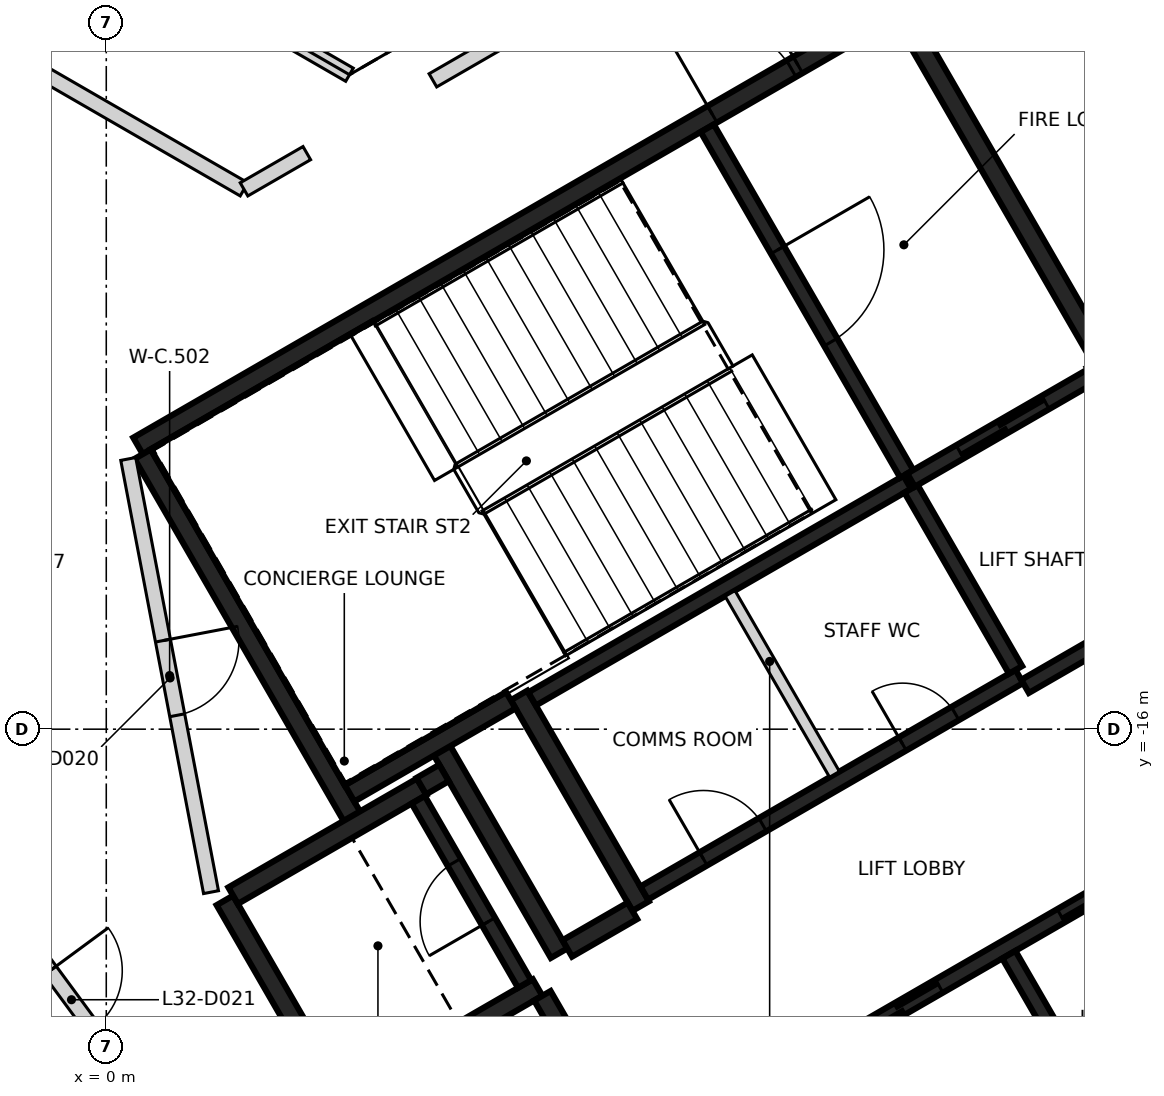
"""IFC4 building model, lengths in metres.
Left out: names, types, materials, properties, quantities, classifications, styles, units other than length and angle.
Written with IfcOpenShell. Run it as: python <this file> out.ifc"""

import sys

from ifc_helpers import new_model, si_unit, direction, frame, frame_2d, origin, place, context, subcontext, project, spatial, rectangle, extrude, element, fill, save


model = new_model("IFC4")
c1 = context("Model", 3, precision=1e-05, world=origin(), true_north=direction((0.0, 1.0)))
c2 = subcontext(c1, "Body", "Model", "MODEL_VIEW")
j1 = project(units=[si_unit("LENGTHUNIT", "METRE"), si_unit("PLANEANGLEUNIT", "RADIAN")], contexts=[c1])
p1 = place(None, origin())
s1 = spatial("IfcSite", under=j1, at=p1, CompositionType="ELEMENT")
p2 = place(p1, origin())
s2 = spatial("IfcBuilding", under=s1, at=p2, CompositionType="ELEMENT")
p3 = place(p2, frame((0.0, 0.0, 132.4)))
s3 = spatial("IfcBuildingStorey", under=s2, at=p3, CompositionType="ELEMENT", Elevation=132.4)
p4 = place(p3, frame((0.417, -12.273, 0.0), z_axis=(0.0, 0.0, 1.0), x_axis=(0.866021906294, 0.500006057782, 0.0)))
e1 = element("IfcWall", 1, at=p4, inside=s3, PredefinedType="SHEAR", context=c2, shape_type="SweptSolid", body=[
    extrude(rectangle(XDim=11.55, YDim=0.25, at=frame_2d((5.775, 0.0))), origin(), (0.0, 0.0, 1.0), 3.2),
])
p5 = place(p4, frame((10.025, 0.0, 0.0)))
e2 = element("IfcOpeningElement", 2, at=p5, cuts=e1, PredefinedType="OPENING", context=c2, shape_type="SweptSolid", body=[
    extrude(rectangle(XDim=1.2, YDim=2.1, at=frame_2d((0.6, 1.05))), frame((0.0, 0.135, 0.0), z_axis=(0.0, -1.0, 0.0), x_axis=(1.0, 0.0, 0.0)), (0.0, 0.0, 1.0), 0.27),
])
p6 = place(p4, frame((8.725, 0.0, 0.0)))
e3 = element("IfcOpeningElement", 3, at=p6, cuts=e1, PredefinedType="OPENING", context=c2, shape_type="SweptSolid", body=[
    extrude(rectangle(XDim=1.2, YDim=2.1, at=frame_2d((0.6, 1.05))), frame((0.0, 0.135, 0.0), z_axis=(0.0, -1.0, 0.0), x_axis=(1.0, 0.0, 0.0)), (0.0, 0.0, 1.0), 0.27),
])
p7 = place(p3, frame((3.235, -17.153, 0.0), z_axis=(0.0, 0.0, 1.0), x_axis=(-0.500008851346, 0.866020293397, 0.0)))
e4 = element("IfcWall", 4, at=p7, inside=s3, PredefinedType="SHEAR", context=c2, shape_type="SweptSolid", body=[
    extrude(rectangle(XDim=5.51, YDim=0.25, at=frame_2d((2.755, 0.0))), origin(), (0.0, 0.0, 1.0), 3.2),
])
p8 = place(p3, frame((10.483, -6.606, 0.0), z_axis=(0.0, 0.0, 1.0), x_axis=(0.49999885962, -0.866026062182, 0.0)))
e5 = element("IfcWall", 5, at=p8, inside=s3, PredefinedType="SHEAR", context=c2, shape_type="SweptSolid", body=[
    extrude(rectangle(XDim=5.225, YDim=0.25, at=frame_2d((2.612, 0.0))), origin(), (0.0, 0.0, 1.0), 3.2),
])
p9 = place(p3, frame((7.031, -18.327, 0.0), z_axis=(0.0, 0.0, 1.0), x_axis=(-0.499971222258, 0.866042017984, 0.0)))
e6 = element("IfcWall", 6, at=p9, inside=s3, PredefinedType="SHEAR", context=c2, shape_type="SweptSolid", body=[
    extrude(rectangle(XDim=3.2, YDim=0.25, at=frame_2d((1.6, 0.0))), origin(), (0.0, 0.0, 1.0), 3.2),
])
p10 = place(p3, frame((3.085, -20.894, 0.0), z_axis=(0.0, 0.0, 1.0), x_axis=(-0.499978833458, 0.866037623948, 0.0)))
e7 = element("IfcWall", 7, at=p10, inside=s3, PredefinedType="SHEAR", context=c2, shape_type="SweptSolid", body=[
    extrude(rectangle(XDim=3.05, YDim=0.25, at=frame_2d((1.525, 0.0))), origin(), (0.0, 0.0, 1.0), 3.2),
])
p11 = place(p3, frame((1.669, -18.19, 0.0), z_axis=(0.0, 0.0, 1.0), x_axis=(0.866042235819, 0.499970844928, 0.0)))
e8 = element("IfcWall", 8, at=p11, inside=s3, PredefinedType="SHEAR", context=c2, shape_type="SweptSolid", body=[
    extrude(rectangle(XDim=2.865, YDim=0.25, at=frame_2d((1.432, 0.0))), origin(), (0.0, 0.0, 1.0), 3.2),
])
p12 = place(p3, frame((5.675, -19.399, 0.0), z_axis=(0.0, 0.0, 1.0), x_axis=(-0.866026637627, -0.499997862916, 0.0)))
e9 = element("IfcWall", 9, at=p12, inside=s3, PredefinedType="SHEAR", context=c2, shape_type="SweptSolid", body=[
    extrude(rectangle(XDim=2.865, YDim=0.25, at=frame_2d((1.432, 0.0))), origin(), (0.0, 0.0, 1.0), 3.2),
])
p13 = place(p3, frame((4.414, -16.276, 0.0), z_axis=(0.0, 0.0, 1.0), x_axis=(0.500003324108, -0.866023484601, 0.0)))
e10 = element("IfcWall", 10, at=p13, inside=s3, PredefinedType="SHEAR", context=c2, shape_type="SweptSolid", body=[
    extrude(rectangle(XDim=3.085, YDim=0.25, at=frame_2d((1.542, 0.0))), origin(), (0.0, 0.0, 1.0), 3.2),
])
p14 = place(p3, frame((5.322, -15.619, 0.0), z_axis=(0.0, 0.0, 1.0), x_axis=(-0.866026229868, -0.499998569178, 0.0)))
e11 = element("IfcWall", 11, at=p14, inside=s3, PredefinedType="SHEAR", context=c2, shape_type="SweptSolid", body=[
    extrude(rectangle(XDim=2.449, YDim=0.25, at=frame_2d((1.225, 0.0))), origin(), (0.0, 0.0, 1.0), 3.2),
])
p15 = place(p3, frame((6.065, -18.885, 0.0), z_axis=(0.0, 0.0, 1.0), x_axis=(0.866017078145, 0.500014420154, 0.0)))
e12 = element("IfcWall", 12, at=p15, inside=s3, PredefinedType="SHEAR", context=c2, shape_type="SweptSolid", body=[
    extrude(rectangle(XDim=0.989, YDim=0.25, at=frame_2d((0.495, 0.0))), origin(), (0.0, 0.0, 1.0), 3.2),
])
p16 = place(p3, frame((6.08, -20.1, 0.0), z_axis=(0.0, 0.0, 1.0), x_axis=(-0.500051773299, 0.865995510393, 0.0)))
e13 = element("IfcWall", 13, at=p16, inside=s3, PredefinedType="SHEAR", context=c2, shape_type="SweptSolid", body=[
    extrude(rectangle(XDim=0.685, YDim=0.25, at=frame_2d((0.342, 0.0))), origin(), (0.0, 0.0, 1.0), 3.2),
])
p17 = place(p3, frame((4.145, -16.749, 0.0), z_axis=(0.0, 0.0, 1.0), x_axis=(0.866185586049, 0.49972245349, 0.0)))
e14 = element("IfcWall", 14, at=p17, inside=s3, PredefinedType="SHEAR", context=c2, shape_type="SweptSolid", body=[
    extrude(rectangle(XDim=0.344, YDim=0.25, at=frame_2d((0.172, 0.0))), origin(), (0.0, 0.0, 1.0), 3.2),
])
p18 = place(p3, frame((9.052, -20.48, 0.0), z_axis=(0.0, 0.0, 1.0), x_axis=(0.866030299012, 0.499991521122, 0.0)))
e15 = element("IfcWall", 15, at=p18, inside=s3, PredefinedType="SHEAR", context=c2, shape_type="SweptSolid", body=[
    extrude(rectangle(XDim=6.1, YDim=0.2, at=frame_2d((3.05, 0.0))), origin(), (0.0, 0.0, 1.0), 3.2),
])
p19 = place(p18, frame((1.0, 0.0, 0.0)))
e16 = element("IfcOpeningElement", 16, at=p19, cuts=e15, PredefinedType="OPENING", context=c2, shape_type="SweptSolid", body=[
    extrude(rectangle(XDim=1.2, YDim=2.1, at=frame_2d((0.6, 1.05))), frame((0.0, 0.11, 0.0), z_axis=(0.0, -1.0, 0.0), x_axis=(1.0, 0.0, 0.0)), (0.0, 0.0, 1.0), 0.22),
])
p20 = place(p18, frame((4.05, 0.0, 0.0)))
e17 = element("IfcOpeningElement", 17, at=p20, cuts=e15, PredefinedType="OPENING", context=c2, shape_type="SweptSolid", body=[
    extrude(rectangle(XDim=1.2, YDim=2.1, at=frame_2d((0.6, 1.05))), frame((0.0, 0.11, 0.0), z_axis=(0.0, -1.0, 0.0), x_axis=(1.0, 0.0, 0.0)), (0.0, 0.0, 1.0), 0.22),
])
p21 = place(p3, frame((10.538, -12.752, 0.0), z_axis=(0.0, 0.0, 1.0), x_axis=(-0.866038630372, -0.499977090179, 0.0)))
e18 = element("IfcWall", 18, at=p21, inside=s3, PredefinedType="SHEAR", context=c2, shape_type="SweptSolid", body=[
    extrude(rectangle(XDim=5.699, YDim=0.2, at=frame_2d((2.85, 0.0))), origin(), (0.0, 0.0, 1.0), 3.2),
])
p22 = place(p3, frame((7.077, -18.156, 0.0), z_axis=(0.0, 0.0, 1.0), x_axis=(0.866038630372, 0.499977090179, 0.0)))
e19 = element("IfcWall", 19, at=p22, inside=s3, PredefinedType="SHEAR", context=c2, shape_type="SweptSolid", body=[
    extrude(rectangle(XDim=5.699, YDim=0.2, at=frame_2d((2.85, 0.0))), origin(), (0.0, 0.0, 1.0), 3.2),
])
p23 = place(p22, frame((0.899, 0.0, 0.0)))
e20 = element("IfcOpeningElement", 20, at=p23, cuts=e19, PredefinedType="OPENING", context=c2, shape_type="SweptSolid", body=[
    extrude(rectangle(XDim=0.9, YDim=2.1, at=frame_2d((0.45, 1.05))), frame((0.0, 0.11, 0.0), z_axis=(0.0, -1.0, 0.0), x_axis=(1.0, 0.0, 0.0)), (0.0, 0.0, 1.0), 0.22),
])
p24 = place(p22, frame((3.924, 0.0, 0.0)))
e21 = element("IfcOpeningElement", 21, at=p24, cuts=e19, PredefinedType="OPENING", context=c2, shape_type="SweptSolid", body=[
    extrude(rectangle(XDim=0.8, YDim=2.1, at=frame_2d((0.4, 1.05))), frame((0.0, 0.11, 0.0), z_axis=(0.0, -1.0, 0.0), x_axis=(1.0, 0.0, 0.0)), (0.0, 0.0, 1.0), 0.22),
])
p25 = place(p3, frame((7.906, -8.094, 0.0), z_axis=(0.0, 0.0, 1.0), x_axis=(0.500024287448, -0.866011380966, 0.0)))
e22 = element("IfcWall", 22, at=p25, inside=s3, PredefinedType="SHEAR", context=c2, shape_type="SweptSolid", body=[
    extrude(rectangle(XDim=5.251, YDim=0.2, at=frame_2d((2.625, 0.0))), origin(), (0.0, 0.0, 1.0), 3.2),
])
p26 = place(p25, frame((1.849, 0.0, 0.0)))
e23 = element("IfcOpeningElement", 23, at=p26, cuts=e22, PredefinedType="OPENING", context=c2, shape_type="SweptSolid", body=[
    extrude(rectangle(XDim=1.4, YDim=2.1, at=frame_2d((0.7, 1.05))), frame((0.0, 0.11, 0.0), z_axis=(0.0, -1.0, 0.0), x_axis=(1.0, 0.0, 0.0)), (0.0, 0.0, 1.0), 0.22),
])
p27 = place(p3, frame((11.875, -18.967, 0.0), z_axis=(0.0, 0.0, 1.0), x_axis=(0.49998131003, -0.866036194175, 0.0)))
e24 = element("IfcWall", 24, at=p27, inside=s3, PredefinedType="SHEAR", context=c2, shape_type="SweptSolid", body=[
    extrude(rectangle(XDim=3.048, YDim=0.2, at=frame_2d((1.524, 0.0))), origin(), (0.0, 0.0, 1.0), 3.2),
])
p28 = place(p3, frame((5.503, -19.352, 0.0), z_axis=(0.0, 0.0, 1.0), x_axis=(-0.499986818241, 0.866033014143, 0.0)))
e25 = element("IfcWall", 25, at=p28, inside=s3, PredefinedType="SHEAR", context=c2, shape_type="SweptSolid", body=[
    extrude(rectangle(XDim=2.798, YDim=0.2, at=frame_2d((1.399, 0.0))), origin(), (0.0, 0.0, 1.0), 3.2),
])
p29 = place(p28, frame((0.949, 0.0, 0.0)))
e26 = element("IfcOpeningElement", 26, at=p29, cuts=e25, PredefinedType="OPENING", context=c2, shape_type="SweptSolid", body=[
    extrude(rectangle(XDim=0.9, YDim=2.1, at=frame_2d((0.45, 1.05))), frame((0.0, 0.11, 0.0), z_axis=(0.0, -1.0, 0.0), x_axis=(1.0, 0.0, 0.0)), (0.0, 0.0, 1.0), 0.22),
])
p30 = place(p3, frame((11.963, -15.22, 0.0), z_axis=(0.0, 0.0, 1.0), x_axis=(-0.500034990121, 0.866005201286, 0.0)))
e27 = element("IfcWall", 27, at=p30, inside=s3, PredefinedType="SHEAR", context=c2, shape_type="SweptSolid", body=[
    extrude(rectangle(XDim=2.75, YDim=0.2, at=frame_2d((1.375, 0.0))), origin(), (0.0, 0.0, 1.0), 3.2),
])
p31 = place(p3, frame((10.587, -12.723, 0.0), z_axis=(0.0, 0.0, 1.0), x_axis=(0.866037306777, 0.499979382845, 0.0)))
e28 = element("IfcWall", 28, at=p31, inside=s3, PredefinedType="SHEAR", context=c2, shape_type="SweptSolid", body=[
    extrude(rectangle(XDim=2.742, YDim=0.2, at=frame_2d((1.371, 0.0))), origin(), (0.0, 0.0, 1.0), 3.2),
])
p32 = place(p31, frame((0.743, 0.0, 0.0)))
e29 = element("IfcOpeningElement", 29, at=p32, cuts=e28, PredefinedType="OPENING", context=c2, shape_type="SweptSolid", body=[
    extrude(rectangle(XDim=1.3, YDim=2.1, at=frame_2d((0.65, 1.05))), frame((0.0, 0.11, 0.0), z_axis=(0.0, -1.0, 0.0), x_axis=(1.0, 0.0, 0.0)), (0.0, 0.0, 1.0), 0.22),
])
p33 = place(p3, frame((14.512, -14.037, 0.0), z_axis=(0.0, 0.0, 1.0), x_axis=(-0.866044696403, -0.499966582715, 0.0)))
e30 = element("IfcWall", 30, at=p33, inside=s3, PredefinedType="SHEAR", context=c2, shape_type="SweptSolid", body=[
    extrude(rectangle(XDim=2.799, YDim=0.2, at=frame_2d((1.399, 0.0))), origin(), (0.0, 0.0, 1.0), 3.2),
])
p34 = place(p3, frame((8.207, -14.214, 0.0), z_axis=(0.0, 0.0, 1.0), x_axis=(0.50002746344, -0.86600954718, 0.0)))
e31 = element("IfcWall", 31, at=p34, inside=s3, PredefinedType="PARTITIONING", context=c2, shape_type="SweptSolid", body=[
    extrude(rectangle(XDim=2.748, YDim=0.15, at=frame_2d((1.374, 0.0))), origin(), (0.0, 0.0, 1.0), 3.2),
])
p35 = place(p3, frame((-8.612, -2.88, 0.0), z_axis=(0.0, 0.0, 1.0), x_axis=(0.866035279512, -0.499982894348, 0.0)))
e32 = element("IfcWall", 32, at=p35, inside=s3, PredefinedType="PARTITIONING", context=c2, shape_type="SweptSolid", body=[
    extrude(rectangle(XDim=12.037, YDim=0.2, at=frame_2d((6.018, 0.0))), origin(), (0.0, 0.0, 1.0), 3.2),
])
p36 = place(p35, frame((1.484, 0.0, 0.0)))
e33 = element("IfcOpeningElement", 33, at=p36, cuts=e32, PredefinedType="OPENING", context=c2, shape_type="SweptSolid", body=[
    extrude(rectangle(XDim=0.9, YDim=2.1, at=frame_2d((0.45, 1.05))), frame((0.0, 0.11, 0.0), z_axis=(0.0, -1.0, 0.0), x_axis=(1.0, 0.0, 0.0)), (0.0, 0.0, 1.0), 0.22),
])
p37 = place(p35, frame((7.491, 0.0, 0.0)))
e34 = element("IfcOpeningElement", 34, at=p37, cuts=e32, PredefinedType="OPENING", context=c2, shape_type="SweptSolid", body=[
    extrude(rectangle(XDim=0.9, YDim=2.1, at=frame_2d((0.45, 1.05))), frame((0.0, 0.11, 0.0), z_axis=(0.0, -1.0, 0.0), x_axis=(1.0, 0.0, 0.0)), (0.0, 0.0, 1.0), 0.22),
])
p38 = place(p3, frame((-0.858, -19.016, 0.0), z_axis=(0.0, 0.0, 1.0), x_axis=(0.593123867414, -0.805111220829, 0.0)))
e35 = element("IfcWall", 35, at=p38, inside=s3, PredefinedType="PARTITIONING", context=c2, shape_type="SweptSolid", body=[
    extrude(rectangle(XDim=2.77, YDim=0.2, at=frame_2d((1.385, 0.0))), origin(), (0.0, 0.0, 1.0), 3.2),
])
p39 = place(p38, frame((0.2, 0.0, 0.0)))
e36 = element("IfcOpeningElement", 36, at=p39, cuts=e35, PredefinedType="OPENING", context=c2, shape_type="SweptSolid", body=[
    extrude(rectangle(XDim=0.95, YDim=2.1, at=frame_2d((0.475, 1.05))), frame((0.0, 0.11, 0.0), z_axis=(0.0, -1.0, 0.0), x_axis=(1.0, 0.0, 0.0)), (0.0, 0.0, 1.0), 0.22),
])
p40 = place(p3, frame((0.289, -12.445, 0.0), z_axis=(0.0, 0.0, 1.0), x_axis=(0.187668946952, -0.982232338273, 0.0)))
e37 = element("IfcWall", 37, at=p40, inside=s3, PredefinedType="PARTITIONING", context=c2, shape_type="SweptSolid", body=[
    extrude(rectangle(XDim=5.802, YDim=0.2, at=frame_2d((2.901, 0.0))), origin(), (0.0, 0.0, 1.0), 3.2),
])
p41 = place(p40, frame((2.433, 0.0, 0.0)))
e38 = element("IfcOpeningElement", 38, at=p41, cuts=e37, PredefinedType="OPENING", context=c2, shape_type="SweptSolid", body=[
    extrude(rectangle(XDim=1.0, YDim=2.1, at=frame_2d((0.5, 1.05))), frame((0.0, 0.11, 0.0), z_axis=(0.0, -1.0, 0.0), x_axis=(1.0, 0.0, 0.0)), (0.0, 0.0, 1.0), 0.22),
])
p42 = place(p3, frame((1.812, -8.898, 0.0), z_axis=(0.0, 0.0, 1.0), x_axis=(0.866108878364, 0.499855389907, 0.0)))
e39 = element("IfcWall", 39, at=p42, inside=s3, PredefinedType="PARTITIONING", context=c2, shape_type="SweptSolid", body=[
    extrude(rectangle(XDim=0.954, YDim=0.2, at=frame_2d((0.477, 0.0))), origin(), (0.0, 0.0, 1.0), 3.2),
])
p43 = place(p3, frame((4.297, -7.464, 0.0), z_axis=(0.0, 0.0, 1.0), x_axis=(0.86602521942, 0.500000319328, 0.0)))
e40 = element("IfcWall", 40, at=p43, inside=s3, PredefinedType="PARTITIONING", context=c2, shape_type="SweptSolid", body=[
    extrude(rectangle(XDim=2.89, YDim=0.2, at=frame_2d((1.445, 0.0))), origin(), (0.0, 0.0, 1.0), 2.3),
])
p44 = place(p3, frame((-8.0, -0.924, 0.0), z_axis=(0.0, 0.0, 1.0), x_axis=(0.86604129137, -0.499972480886, 0.0)))
e41 = element("IfcWall", 41, at=p44, inside=s3, PredefinedType="PARTITIONING", context=c2, shape_type="SweptSolid", body=[
    extrude(rectangle(XDim=12.932, YDim=0.2, at=frame_2d((6.466, 0.0))), origin(), (0.0, 0.0, 1.0), 2.3),
])
p45 = place(p32, origin())
e42 = element("IfcDoor", 42, at=p45, inside=s3, OperationType="SLIDING_TO_LEFT", PredefinedType="DOOR", context=c2, shape_type="SweptSolid", body=[
    extrude(rectangle(XDim=1.3, YDim=2.1, at=frame_2d((0.65, 1.05))), frame((0.0, 0.025, 0.0), z_axis=(0.0, -1.0, 0.0), x_axis=(1.0, 0.0, 0.0)), (0.0, 0.0, 1.0), 0.05),
])
fill(e29, e42)
p46 = place(p19, origin())
e43 = element("IfcDoor", 43, at=p46, inside=s3, OperationType="DOUBLE_DOOR_SLIDING", PredefinedType="DOOR", context=c2, shape_type="SweptSolid", body=[
    extrude(rectangle(XDim=1.2, YDim=2.1, at=frame_2d((0.6, 1.05))), frame((0.0, 0.025, 0.0), z_axis=(0.0, -1.0, 0.0), x_axis=(1.0, 0.0, 0.0)), (0.0, 0.0, 1.0), 0.05),
])
fill(e16, e43)
p47 = place(p20, origin())
e44 = element("IfcDoor", 44, at=p47, inside=s3, OperationType="DOUBLE_DOOR_SLIDING", PredefinedType="DOOR", context=c2, shape_type="SweptSolid", body=[
    extrude(rectangle(XDim=1.2, YDim=2.1, at=frame_2d((0.6, 1.05))), frame((0.0, 0.025, 0.0), z_axis=(0.0, -1.0, 0.0), x_axis=(1.0, 0.0, 0.0)), (0.0, 0.0, 1.0), 0.05),
])
fill(e17, e44)
p48 = place(p5, origin())
e45 = element("IfcDoor", 45, at=p48, inside=s3, OperationType="SINGLE_SWING_LEFT", PredefinedType="DOOR", context=c2, shape_type="SweptSolid", body=[
    extrude(rectangle(XDim=1.2, YDim=2.1, at=frame_2d((0.6, 1.05))), frame((0.0, 0.025, 0.0), z_axis=(0.0, -1.0, 0.0), x_axis=(1.0, 0.0, 0.0)), (0.0, 0.0, 1.0), 0.05),
])
fill(e2, e45)
p49 = place(p6, origin())
e46 = element("IfcDoor", 46, at=p49, inside=s3, OperationType="SINGLE_SWING_RIGHT", PredefinedType="DOOR", context=c2, shape_type="SweptSolid", body=[
    extrude(rectangle(XDim=1.2, YDim=2.1, at=frame_2d((0.6, 1.05))), frame((0.0, 0.025, 0.0), z_axis=(0.0, -1.0, 0.0), x_axis=(1.0, 0.0, 0.0)), (0.0, 0.0, 1.0), 0.05),
])
fill(e3, e46)
p50 = place(p26, origin())
e47 = element("IfcDoor", 47, at=p50, inside=s3, OperationType="SINGLE_SWING_LEFT", PredefinedType="DOOR", context=c2, shape_type="SweptSolid", body=[
    extrude(rectangle(XDim=1.4, YDim=2.1, at=frame_2d((0.7, 1.05))), frame((0.0, 0.025, 0.0), z_axis=(0.0, -1.0, 0.0), x_axis=(1.0, 0.0, 0.0)), (0.0, 0.0, 1.0), 0.05),
])
fill(e23, e47)
p51 = place(p23, origin())
e48 = element("IfcDoor", 48, at=p51, inside=s3, OperationType="SINGLE_SWING_RIGHT", PredefinedType="DOOR", context=c2, shape_type="SweptSolid", body=[
    extrude(rectangle(XDim=0.9, YDim=2.1, at=frame_2d((0.45, 1.05))), frame((0.0, 0.025, 0.0), z_axis=(0.0, -1.0, 0.0), x_axis=(1.0, 0.0, 0.0)), (0.0, 0.0, 1.0), 0.05),
])
fill(e20, e48)
p52 = place(p24, origin())
e49 = element("IfcDoor", 49, at=p52, inside=s3, OperationType="SINGLE_SWING_LEFT", PredefinedType="DOOR", context=c2, shape_type="SweptSolid", body=[
    extrude(rectangle(XDim=0.8, YDim=2.1, at=frame_2d((0.4, 1.05))), frame((0.0, 0.025, 0.0), z_axis=(0.0, -1.0, 0.0), x_axis=(1.0, 0.0, 0.0)), (0.0, 0.0, 1.0), 0.05),
])
fill(e21, e49)
p53 = place(p29, origin())
e50 = element("IfcDoor", 50, at=p53, inside=s3, OperationType="SINGLE_SWING_RIGHT", PredefinedType="DOOR", context=c2, shape_type="SweptSolid", body=[
    extrude(rectangle(XDim=0.9, YDim=2.1, at=frame_2d((0.45, 1.05))), frame((0.0, 0.025, 0.0), z_axis=(0.0, -1.0, 0.0), x_axis=(1.0, 0.0, 0.0)), (0.0, 0.0, 1.0), 0.05),
])
fill(e26, e50)
p54 = place(p41, origin())
e51 = element("IfcDoor", 51, at=p54, inside=s3, OperationType="SINGLE_SWING_LEFT", PredefinedType="DOOR", context=c2, shape_type="SweptSolid", body=[
    extrude(rectangle(XDim=1.0, YDim=2.1, at=frame_2d((0.5, 1.05))), frame((0.0, 0.025, 0.0), z_axis=(0.0, -1.0, 0.0), x_axis=(1.0, 0.0, 0.0)), (0.0, 0.0, 1.0), 0.05),
])
fill(e38, e51)
p55 = place(p39, frame((0.95, 0.0, 0.0), z_axis=(0.0, 0.0, 1.0), x_axis=(-1.0, 0.0, 0.0)))
e52 = element("IfcDoor", 52, at=p55, inside=s3, OperationType="SINGLE_SWING_LEFT", PredefinedType="DOOR", context=c2, shape_type="SweptSolid", body=[
    extrude(rectangle(XDim=0.95, YDim=2.1, at=frame_2d((0.475, 1.05))), frame((0.0, 0.025, 0.0), z_axis=(0.0, -1.0, 0.0), x_axis=(1.0, 0.0, 0.0)), (0.0, 0.0, 1.0), 0.05),
])
fill(e36, e52)
save(model, sys.argv[1])
